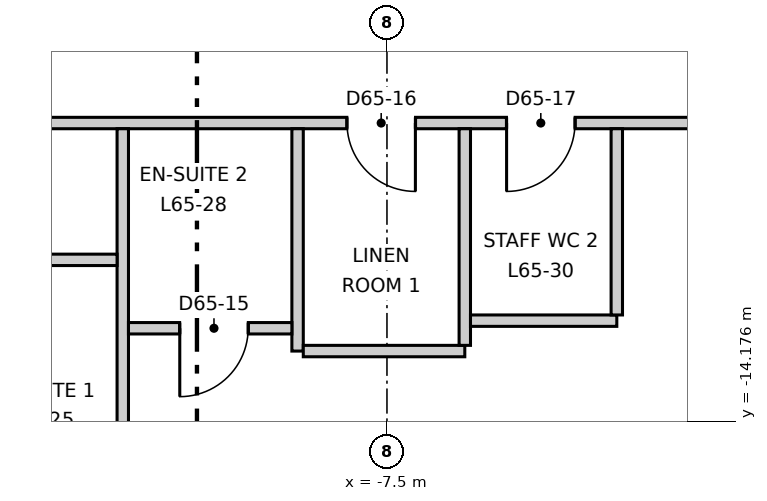
"""IFC4 building model, lengths in metres.
Left out: names, types, materials, properties, quantities, classifications, styles, units other than length and angle.
Written with IfcOpenShell. Run it as: python <this file> out.ifc"""

import sys

from ifc_helpers import new_model, si_unit, direction, frame, frame_2d, origin, place, context, subcontext, project, spatial, rectangle, extrude, element, fill, save


model = new_model("IFC4")
c1 = context("Model", 3, precision=1e-05, world=origin(), true_north=direction((0.0, 1.0)))
c2 = subcontext(c1, "Body", "Model", "MODEL_VIEW")
j1 = project(units=[si_unit("LENGTHUNIT", "METRE"), si_unit("PLANEANGLEUNIT", "RADIAN")], contexts=[c1])
p1 = place(None, origin())
s1 = spatial("IfcSite", under=j1, at=p1, CompositionType="ELEMENT")
p2 = place(p1, origin())
s2 = spatial("IfcBuilding", under=s1, at=p2, CompositionType="ELEMENT")
p3 = place(p2, frame((0.0, 0.0, 279.1)))
s3 = spatial("IfcBuildingStorey", under=s2, at=p3, CompositionType="ELEMENT", Elevation=279.1)
p4 = place(p3, frame((-2.536, 28.316, 0.0), z_axis=(0.0, 0.0, 1.0), x_axis=(-0.500006870765, -0.86602143691, 0.0)))
e1 = element("IfcWall", 1, at=p4, inside=s3, PredefinedType="ELEMENTEDWALL", context=c2, shape_type="SweptSolid", body=[
    extrude(rectangle(XDim=46.49, YDim=0.2, at=frame_2d((23.245, 0.0))), origin(), (0.0, 0.0, 1.0), 3.3),
])
p5 = place(p4, frame((2.196, 0.0, 0.9)))
e2 = element("IfcOpeningElement", 2, at=p5, cuts=e1, PredefinedType="OPENING", context=c2, shape_type="SweptSolid", body=[
    extrude(rectangle(XDim=3.7, YDim=2.2, at=frame_2d((1.85, 1.1))), frame((0.0, 0.11, 0.0), z_axis=(0.0, -1.0, 0.0), x_axis=(1.0, 0.0, 0.0)), (0.0, 0.0, 1.0), 0.22),
])
p6 = place(p4, frame((7.684, 0.0, 0.9)))
e3 = element("IfcOpeningElement", 3, at=p6, cuts=e1, PredefinedType="OPENING", context=c2, shape_type="SweptSolid", body=[
    extrude(rectangle(XDim=3.7, YDim=2.2, at=frame_2d((1.85, 1.1))), frame((0.0, 0.11, 0.0), z_axis=(0.0, -1.0, 0.0), x_axis=(1.0, 0.0, 0.0)), (0.0, 0.0, 1.0), 0.22),
])
p7 = place(p4, frame((13.172, 0.0, 0.9)))
e4 = element("IfcOpeningElement", 4, at=p7, cuts=e1, PredefinedType="OPENING", context=c2, shape_type="SweptSolid", body=[
    extrude(rectangle(XDim=3.7, YDim=2.2, at=frame_2d((1.85, 1.1))), frame((0.0, 0.11, 0.0), z_axis=(0.0, -1.0, 0.0), x_axis=(1.0, 0.0, 0.0)), (0.0, 0.0, 1.0), 0.22),
])
p8 = place(p4, frame((18.66, 0.0, 0.9)))
e5 = element("IfcOpeningElement", 5, at=p8, cuts=e1, PredefinedType="OPENING", context=c2, shape_type="SweptSolid", body=[
    extrude(rectangle(XDim=3.7, YDim=2.2, at=frame_2d((1.85, 1.1))), frame((0.0, 0.11, 0.0), z_axis=(0.0, -1.0, 0.0), x_axis=(1.0, 0.0, 0.0)), (0.0, 0.0, 1.0), 0.22),
])
p9 = place(p4, frame((24.148, 0.0, 0.9)))
e6 = element("IfcOpeningElement", 6, at=p9, cuts=e1, PredefinedType="OPENING", context=c2, shape_type="SweptSolid", body=[
    extrude(rectangle(XDim=3.7, YDim=2.2, at=frame_2d((1.85, 1.1))), frame((0.0, 0.11, 0.0), z_axis=(0.0, -1.0, 0.0), x_axis=(1.0, 0.0, 0.0)), (0.0, 0.0, 1.0), 0.22),
])
p10 = place(p4, frame((29.636, 0.0, 0.9)))
e7 = element("IfcOpeningElement", 7, at=p10, cuts=e1, PredefinedType="OPENING", context=c2, shape_type="SweptSolid", body=[
    extrude(rectangle(XDim=3.7, YDim=2.2, at=frame_2d((1.85, 1.1))), frame((0.0, 0.11, 0.0), z_axis=(0.0, -1.0, 0.0), x_axis=(1.0, 0.0, 0.0)), (0.0, 0.0, 1.0), 0.22),
])
p11 = place(p4, frame((35.124, 0.0, 0.9)))
e8 = element("IfcOpeningElement", 8, at=p11, cuts=e1, PredefinedType="OPENING", context=c2, shape_type="SweptSolid", body=[
    extrude(rectangle(XDim=3.7, YDim=2.2, at=frame_2d((1.85, 1.1))), frame((0.0, 0.11, 0.0), z_axis=(0.0, -1.0, 0.0), x_axis=(1.0, 0.0, 0.0)), (0.0, 0.0, 1.0), 0.22),
])
p12 = place(p4, frame((40.612, 0.0, 0.9)))
e9 = element("IfcOpeningElement", 9, at=p12, cuts=e1, PredefinedType="OPENING", context=c2, shape_type="SweptSolid", body=[
    extrude(rectangle(XDim=3.7, YDim=2.2, at=frame_2d((1.85, 1.1))), frame((0.0, 0.11, 0.0), z_axis=(0.0, -1.0, 0.0), x_axis=(1.0, 0.0, 0.0)), (0.0, 0.0, 1.0), 0.22),
])
p13 = place(p3, frame((-17.678, -10.119, 0.0), z_axis=(0.0, 0.0, 1.0), x_axis=(0.500003190174, 0.866023561929, 0.0)))
e10 = element("IfcWall", 10, at=p13, inside=s3, PredefinedType="PARTITIONING", context=c2, shape_type="SweptSolid", body=[
    extrude(rectangle(XDim=35.356, YDim=0.15, at=frame_2d((17.678, 0.0))), origin(), (0.0, 0.0, 1.0), 3.3),
])
p14 = place(p13, frame((28.706, 0.0, 0.0)))
e11 = element("IfcOpeningElement", 11, at=p14, cuts=e10, PredefinedType="OPENING", context=c2, shape_type="SweptSolid", body=[
    extrude(rectangle(XDim=1.0, YDim=2.1, at=frame_2d((0.5, 1.05))), frame((0.0, 0.085, 0.0), z_axis=(0.0, -1.0, 0.0), x_axis=(1.0, 0.0, 0.0)), (0.0, 0.0, 1.0), 0.17),
])
p15 = place(p13, frame((18.74, 0.0, 0.0)))
e12 = element("IfcOpeningElement", 12, at=p15, cuts=e10, PredefinedType="OPENING", context=c2, shape_type="SweptSolid", body=[
    extrude(rectangle(XDim=1.0, YDim=2.1, at=frame_2d((0.5, 1.05))), frame((0.0, 0.085, 0.0), z_axis=(0.0, -1.0, 0.0), x_axis=(1.0, 0.0, 0.0)), (0.0, 0.0, 1.0), 0.17),
])
p16 = place(p13, frame((9.352, 0.0, 0.0)))
e13 = element("IfcOpeningElement", 13, at=p16, cuts=e10, PredefinedType="OPENING", context=c2, shape_type="SweptSolid", body=[
    extrude(rectangle(XDim=1.0, YDim=2.1, at=frame_2d((0.5, 1.05))), frame((0.0, 0.085, 0.0), z_axis=(0.0, -1.0, 0.0), x_axis=(1.0, 0.0, 0.0)), (0.0, 0.0, 1.0), 0.17),
])
p17 = place(p13, frame((2.777, 0.0, 0.0)))
e14 = element("IfcOpeningElement", 14, at=p17, cuts=e10, PredefinedType="OPENING", context=c2, shape_type="SweptSolid", body=[
    extrude(rectangle(XDim=1.0, YDim=2.1, at=frame_2d((0.5, 1.05))), frame((0.0, 0.085, 0.0), z_axis=(0.0, -1.0, 0.0), x_axis=(1.0, 0.0, 0.0)), (0.0, 0.0, 1.0), 0.17),
])
p18 = place(p3, frame((-17.604, -10.25, 0.0), z_axis=(0.0, 0.0, 1.0), x_axis=(1.0, 0.0, 0.0)))
e15 = element("IfcWall", 15, at=p18, inside=s3, PredefinedType="PARTITIONING", context=c2, shape_type="SweptSolid", body=[
    extrude(rectangle(XDim=35.358, YDim=0.15, at=frame_2d((17.679, 0.0))), origin(), (0.0, 0.0, 1.0), 3.3),
])
p19 = place(p18, frame((2.7, 0.0, 0.0)))
e16 = element("IfcOpeningElement", 16, at=p19, cuts=e15, PredefinedType="OPENING", context=c2, shape_type="SweptSolid", body=[
    extrude(rectangle(XDim=1.0, YDim=2.1, at=frame_2d((0.5, 1.05))), frame((0.0, 0.085, 0.0), z_axis=(0.0, -1.0, 0.0), x_axis=(1.0, 0.0, 0.0)), (0.0, 0.0, 1.0), 0.17),
])
p20 = place(p18, frame((14.878, 0.0, 0.0)))
e17 = element("IfcOpeningElement", 17, at=p20, cuts=e15, PredefinedType="OPENING", context=c2, shape_type="SweptSolid", body=[
    extrude(rectangle(XDim=1.0, YDim=2.1, at=frame_2d((0.5, 1.05))), frame((0.0, 0.085, 0.0), z_axis=(0.0, -1.0, 0.0), x_axis=(1.0, 0.0, 0.0)), (0.0, 0.0, 1.0), 0.17),
])
p21 = place(p18, frame((9.578, 0.0, 0.0)))
e18 = element("IfcOpeningElement", 18, at=p21, cuts=e15, PredefinedType="OPENING", context=c2, shape_type="SweptSolid", body=[
    extrude(rectangle(XDim=0.9, YDim=2.1, at=frame_2d((0.45, 1.05))), frame((0.0, 0.085, 0.0), z_axis=(0.0, -1.0, 0.0), x_axis=(1.0, 0.0, 0.0)), (0.0, 0.0, 1.0), 0.17),
])
p22 = place(p18, frame((11.678, 0.0, 0.0)))
e19 = element("IfcOpeningElement", 19, at=p22, cuts=e15, PredefinedType="OPENING", context=c2, shape_type="SweptSolid", body=[
    extrude(rectangle(XDim=0.9, YDim=2.1, at=frame_2d((0.45, 1.05))), frame((0.0, 0.085, 0.0), z_axis=(0.0, -1.0, 0.0), x_axis=(1.0, 0.0, 0.0)), (0.0, 0.0, 1.0), 0.17),
])
p23 = place(p18, frame((25.854, 0.0, 0.0)))
e20 = element("IfcOpeningElement", 20, at=p23, cuts=e15, PredefinedType="OPENING", context=c2, shape_type="SweptSolid", body=[
    extrude(rectangle(XDim=1.0, YDim=2.1, at=frame_2d((0.5, 1.05))), frame((0.0, 0.085, 0.0), z_axis=(0.0, -1.0, 0.0), x_axis=(1.0, 0.0, 0.0)), (0.0, 0.0, 1.0), 0.17),
])
p24 = place(p18, frame((20.554, 0.0, 0.0)))
e21 = element("IfcOpeningElement", 21, at=p24, cuts=e15, PredefinedType="OPENING", context=c2, shape_type="SweptSolid", body=[
    extrude(rectangle(XDim=0.9, YDim=2.1, at=frame_2d((0.45, 1.05))), frame((0.0, 0.085, 0.0), z_axis=(0.0, -1.0, 0.0), x_axis=(1.0, 0.0, 0.0)), (0.0, 0.0, 1.0), 0.17),
])
p25 = place(p18, frame((22.654, 0.0, 0.0)))
e22 = element("IfcOpeningElement", 22, at=p25, cuts=e15, PredefinedType="OPENING", context=c2, shape_type="SweptSolid", body=[
    extrude(rectangle(XDim=0.9, YDim=2.1, at=frame_2d((0.45, 1.05))), frame((0.0, 0.085, 0.0), z_axis=(0.0, -1.0, 0.0), x_axis=(1.0, 0.0, 0.0)), (0.0, 0.0, 1.0), 0.17),
])
p26 = place(p18, frame((31.43, 0.0, 0.0)))
e23 = element("IfcOpeningElement", 23, at=p26, cuts=e15, PredefinedType="OPENING", context=c2, shape_type="SweptSolid", body=[
    extrude(rectangle(XDim=1.0, YDim=2.1, at=frame_2d((0.5, 1.05))), frame((0.0, 0.085, 0.0), z_axis=(0.0, -1.0, 0.0), x_axis=(1.0, 0.0, 0.0)), (0.0, 0.0, 1.0), 0.17),
])
p27 = place(p3, frame((-10.976, -16.274, 0.0), z_axis=(0.0, 0.0, 1.0), x_axis=(0.0, 1.0, 0.0)))
e24 = element("IfcWall", 24, at=p27, inside=s3, PredefinedType="PARTITIONING", context=c2, shape_type="SweptSolid", body=[
    extrude(rectangle(XDim=5.949, YDim=0.15, at=frame_2d((2.975, 0.0))), origin(), (0.0, 0.0, 1.0), 3.3),
])
p28 = place(p3, frame((-8.676, -13.25, 0.0), z_axis=(0.0, 0.0, 1.0), x_axis=(0.0, 1.0, 0.0)))
e25 = element("IfcWall", 25, at=p28, inside=s3, PredefinedType="PARTITIONING", context=c2, shape_type="SweptSolid", body=[
    extrude(rectangle(XDim=2.925, YDim=0.15, at=frame_2d((1.462, 0.0))), origin(), (0.0, 0.0, 1.0), 3.3),
])
p29 = place(p3, frame((-8.601, -13.25, 0.0), z_axis=(0.0, 0.0, 1.0), x_axis=(1.0, 0.0, 0.0)))
e26 = element("IfcWall", 26, at=p29, inside=s3, PredefinedType="PARTITIONING", context=c2, shape_type="SweptSolid", body=[
    extrude(rectangle(XDim=2.125, YDim=0.15, at=frame_2d((1.062, 0.0))), origin(), (0.0, 0.0, 1.0), 3.3),
])
p30 = place(p3, frame((-6.476, -13.175, 0.0), z_axis=(0.0, 0.0, 1.0), x_axis=(0.0, 1.0, 0.0)))
e27 = element("IfcWall", 27, at=p30, inside=s3, PredefinedType="PARTITIONING", context=c2, shape_type="SweptSolid", body=[
    extrude(rectangle(XDim=2.85, YDim=0.15, at=frame_2d((1.425, 0.0))), origin(), (0.0, 0.0, 1.0), 3.3),
])
p31 = place(p3, frame((-6.401, -12.85, 0.0), z_axis=(0.0, 0.0, 1.0), x_axis=(1.0, 0.0, 0.0)))
e28 = element("IfcWall", 28, at=p31, inside=s3, PredefinedType="PARTITIONING", context=c2, shape_type="SweptSolid", body=[
    extrude(rectangle(XDim=1.925, YDim=0.15, at=frame_2d((0.962, 0.0))), origin(), (0.0, 0.0, 1.0), 3.3),
])
p32 = place(p3, frame((-4.476, -12.775, 0.0), z_axis=(0.0, 0.0, 1.0), x_axis=(0.0, 1.0, 0.0)))
e29 = element("IfcWall", 29, at=p32, inside=s3, PredefinedType="PARTITIONING", context=c2, shape_type="SweptSolid", body=[
    extrude(rectangle(XDim=2.45, YDim=0.15, at=frame_2d((1.225, 0.0))), origin(), (0.0, 0.0, 1.0), 3.3),
])
p33 = place(p3, frame((-16.576, -12.05, 0.0), z_axis=(0.0, 0.0, 1.0), x_axis=(1.0, 0.0, 0.0)))
e30 = element("IfcWall", 30, at=p33, inside=s3, PredefinedType="PARTITIONING", context=c2, shape_type="SweptSolid", body=[
    extrude(rectangle(XDim=5.525, YDim=0.15, at=frame_2d((2.762, 0.0))), origin(), (0.0, 0.0, 1.0), 3.3),
])
p34 = place(p33, frame((3.55, 0.0, 0.0)))
e31 = element("IfcOpeningElement", 31, at=p34, cuts=e30, PredefinedType="OPENING", context=c2, shape_type="SweptSolid", body=[
    extrude(rectangle(XDim=0.9, YDim=2.1, at=frame_2d((0.45, 1.05))), frame((0.0, 0.085, 0.0), z_axis=(0.0, -1.0, 0.0), x_axis=(1.0, 0.0, 0.0)), (0.0, 0.0, 1.0), 0.17),
])
p35 = place(p3, frame((-10.901, -12.95, 0.0), z_axis=(0.0, 0.0, 1.0), x_axis=(1.0, 0.0, 0.0)))
e32 = element("IfcWall", 32, at=p35, inside=s3, PredefinedType="PARTITIONING", context=c2, shape_type="SweptSolid", body=[
    extrude(rectangle(XDim=2.15, YDim=0.15, at=frame_2d((1.075, 0.0))), origin(), (0.0, 0.0, 1.0), 3.3),
])
p36 = place(p35, frame((0.675, 0.0, 0.0)))
e33 = element("IfcOpeningElement", 33, at=p36, cuts=e32, PredefinedType="OPENING", context=c2, shape_type="SweptSolid", body=[
    extrude(rectangle(XDim=0.9, YDim=2.1, at=frame_2d((0.45, 1.05))), frame((0.0, 0.085, 0.0), z_axis=(0.0, -1.0, 0.0), x_axis=(1.0, 0.0, 0.0)), (0.0, 0.0, 1.0), 0.17),
])
p37 = place(p36, origin())
e34 = element("IfcDoor", 34, at=p37, inside=s3, OperationType="SINGLE_SWING_LEFT", PredefinedType="DOOR", context=c2, shape_type="SweptSolid", body=[
    extrude(rectangle(XDim=0.9, YDim=2.1, at=frame_2d((0.45, 1.05))), frame((0.0, 0.025, 0.0), z_axis=(0.0, -1.0, 0.0), x_axis=(1.0, 0.0, 0.0)), (0.0, 0.0, 1.0), 0.05),
])
fill(e33, e34)
p38 = place(p21, origin())
e35 = element("IfcDoor", 35, at=p38, inside=s3, OperationType="SINGLE_SWING_RIGHT", PredefinedType="DOOR", context=c2, shape_type="SweptSolid", body=[
    extrude(rectangle(XDim=0.9, YDim=2.1, at=frame_2d((0.45, 1.05))), frame((0.0, 0.025, 0.0), z_axis=(0.0, -1.0, 0.0), x_axis=(1.0, 0.0, 0.0)), (0.0, 0.0, 1.0), 0.05),
])
fill(e18, e35)
p39 = place(p22, origin())
e36 = element("IfcDoor", 36, at=p39, inside=s3, OperationType="SINGLE_SWING_LEFT", PredefinedType="DOOR", context=c2, shape_type="SweptSolid", body=[
    extrude(rectangle(XDim=0.9, YDim=2.1, at=frame_2d((0.45, 1.05))), frame((0.0, 0.025, 0.0), z_axis=(0.0, -1.0, 0.0), x_axis=(1.0, 0.0, 0.0)), (0.0, 0.0, 1.0), 0.05),
])
fill(e19, e36)
save(model, sys.argv[1])
